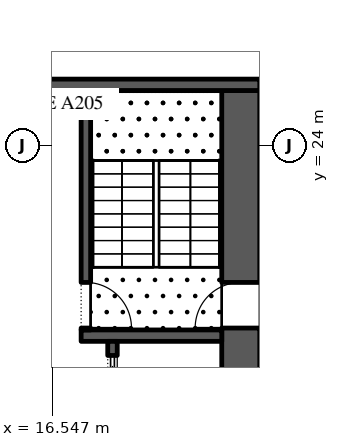
"""IFC4 building model, lengths in metres.
Left out: names, types, materials, properties, quantities, classifications, styles, units other than length and angle.
Written with IfcOpenShell. Run it as: python <this file> out.ifc"""

import sys

from ifc_helpers import new_model, si_unit, direction, frame, frame_2d, origin, place, context, subcontext, project, spatial, rectangle, extrude, element, fill, save


model = new_model("IFC4")
c1 = context("Model", 3, precision=1e-05, world=origin(), true_north=direction((0.0, 1.0)))
c2 = subcontext(c1, "Body", "Model", "MODEL_VIEW")
j1 = project(units=[si_unit("LENGTHUNIT", "METRE"), si_unit("PLANEANGLEUNIT", "RADIAN")], contexts=[c1])
p1 = place(None, origin())
s1 = spatial("IfcSite", under=j1, at=p1, CompositionType="ELEMENT")
p2 = place(p1, origin())
s2 = spatial("IfcBuilding", under=s1, at=p2, CompositionType="ELEMENT")
p3 = place(p2, frame((0.0, 0.0, 14.0)))
s3 = spatial("IfcBuildingStorey", under=s2, at=p3, CompositionType="ELEMENT", Elevation=14.0)
p4 = place(p3, frame((21.5, -2.45, 0.0), z_axis=(0.0, 0.0, 1.0), x_axis=(0.0, 1.0, 0.0)))
e1 = element("IfcWall", 1, at=p4, inside=s3, PredefinedType="SHEAR", context=c2, shape_type="SweptSolid", body=[
    extrude(rectangle(XDim=27.9, YDim=1.0, at=frame_2d((13.95, 0.0))), origin(), (0.0, 0.0, 1.0), 4.9),
])
p5 = place(p4, frame((5.05, 0.0, 0.0)))
e2 = element("IfcOpeningElement", 2, at=p5, cuts=e1, PredefinedType="OPENING", context=c2, shape_type="SweptSolid", body=[
    extrude(rectangle(XDim=1.2, YDim=2.1, at=frame_2d((0.6, 1.05))), frame((0.0, 0.51, 0.0), z_axis=(0.0, -1.0, 0.0), x_axis=(1.0, 0.0, 0.0)), (0.0, 0.0, 1.0), 1.02),
])
p6 = place(p4, frame((21.65, 0.0, 0.0)))
e3 = element("IfcOpeningElement", 3, at=p6, cuts=e1, PredefinedType="OPENING", context=c2, shape_type="SweptSolid", body=[
    extrude(rectangle(XDim=1.2, YDim=2.1, at=frame_2d((0.6, 1.05))), frame((0.0, 0.51, 0.0), z_axis=(0.0, -1.0, 0.0), x_axis=(1.0, 0.0, 0.0)), (0.0, 0.0, 1.0), 1.02),
])
p7 = place(p3, frame((10.0, 25.6, 0.0), z_axis=(0.0, 0.0, 1.0), x_axis=(1.0, 0.0, 0.0)))
e4 = element("IfcWall", 4, at=p7, inside=s3, PredefinedType="SHEAR", context=c2, shape_type="SweptSolid", body=[
    extrude(rectangle(XDim=12.0, YDim=0.3, at=frame_2d((6.0, 0.0))), origin(), (0.0, 0.0, 1.0), 4.9),
])
p8 = place(p3, frame((17.3, 19.0, 0.0), z_axis=(0.0, 0.0, 1.0), x_axis=(1.0, 0.0, 0.0)))
e5 = element("IfcWall", 5, at=p8, inside=s3, PredefinedType="SHEAR", context=c2, shape_type="SweptSolid", body=[
    extrude(rectangle(XDim=3.7, YDim=0.3, at=frame_2d((1.85, 0.0))), origin(), (0.0, 0.0, 1.0), 4.9),
])
p9 = place(p3, frame((17.425, 19.15, 0.0), z_axis=(0.0, 0.0, 1.0), x_axis=(0.0, 1.0, 0.0)))
e6 = element("IfcWall", 6, at=p9, inside=s3, PredefinedType="SHEAR", context=c2, shape_type="SweptSolid", body=[
    extrude(rectangle(XDim=6.3, YDim=0.25, at=frame_2d((3.15, 0.0))), origin(), (0.0, 0.0, 1.0), 4.9),
])
p10 = place(p9, frame((0.05, 0.0, 0.0)))
e7 = element("IfcOpeningElement", 7, at=p10, cuts=e6, PredefinedType="OPENING", context=c2, shape_type="SweptSolid", body=[
    extrude(rectangle(XDim=1.2, YDim=2.1, at=frame_2d((0.6, 1.05))), frame((0.0, 0.135, 0.0), z_axis=(0.0, -1.0, 0.0), x_axis=(1.0, 0.0, 0.0)), (0.0, 0.0, 1.0), 0.27),
])
p11 = place(p3, frame((18.125, 4.15, 0.0), z_axis=(0.0, 0.0, 1.0), x_axis=(0.0, 1.0, 0.0)))
e8 = element("IfcWall", 8, at=p11, inside=s3, PredefinedType="SHEAR", context=c2, shape_type="SweptSolid", body=[
    extrude(rectangle(XDim=14.7, YDim=0.25, at=frame_2d((7.35, 0.0))), origin(), (0.0, 0.0, 1.0), 4.9),
])
p12 = place(p11, frame((0.371, 0.0, 0.0)))
e9 = element("IfcOpeningElement", 9, at=p12, cuts=e8, PredefinedType="OPENING", context=c2, shape_type="SweptSolid", body=[
    extrude(rectangle(XDim=1.1, YDim=2.1, at=frame_2d((0.55, 1.05))), frame((0.0, 0.135, 0.0), z_axis=(0.0, -1.0, 0.0), x_axis=(1.0, 0.0, 0.0)), (0.0, 0.0, 1.0), 0.27),
])
p13 = place(p11, frame((2.514, 0.0, 0.0)))
e10 = element("IfcOpeningElement", 10, at=p13, cuts=e8, PredefinedType="OPENING", context=c2, shape_type="SweptSolid", body=[
    extrude(rectangle(XDim=1.1, YDim=2.1, at=frame_2d((0.55, 1.05))), frame((0.0, 0.135, 0.0), z_axis=(0.0, -1.0, 0.0), x_axis=(1.0, 0.0, 0.0)), (0.0, 0.0, 1.0), 0.27),
])
p14 = place(p11, frame((4.657, 0.0, 0.0)))
e11 = element("IfcOpeningElement", 11, at=p14, cuts=e8, PredefinedType="OPENING", context=c2, shape_type="SweptSolid", body=[
    extrude(rectangle(XDim=1.1, YDim=2.1, at=frame_2d((0.55, 1.05))), frame((0.0, 0.135, 0.0), z_axis=(0.0, -1.0, 0.0), x_axis=(1.0, 0.0, 0.0)), (0.0, 0.0, 1.0), 0.27),
])
p15 = place(p11, frame((6.8, 0.0, 0.0)))
e12 = element("IfcOpeningElement", 12, at=p15, cuts=e8, PredefinedType="OPENING", context=c2, shape_type="SweptSolid", body=[
    extrude(rectangle(XDim=1.1, YDim=2.1, at=frame_2d((0.55, 1.05))), frame((0.0, 0.135, 0.0), z_axis=(0.0, -1.0, 0.0), x_axis=(1.0, 0.0, 0.0)), (0.0, 0.0, 1.0), 0.27),
])
p16 = place(p11, frame((8.943, 0.0, 0.0)))
e13 = element("IfcOpeningElement", 13, at=p16, cuts=e8, PredefinedType="OPENING", context=c2, shape_type="SweptSolid", body=[
    extrude(rectangle(XDim=1.1, YDim=2.1, at=frame_2d((0.55, 1.05))), frame((0.0, 0.135, 0.0), z_axis=(0.0, -1.0, 0.0), x_axis=(1.0, 0.0, 0.0)), (0.0, 0.0, 1.0), 0.27),
])
p17 = place(p11, frame((11.086, 0.0, 0.0)))
e14 = element("IfcOpeningElement", 14, at=p17, cuts=e8, PredefinedType="OPENING", context=c2, shape_type="SweptSolid", body=[
    extrude(rectangle(XDim=1.1, YDim=2.1, at=frame_2d((0.55, 1.05))), frame((0.0, 0.135, 0.0), z_axis=(0.0, -1.0, 0.0), x_axis=(1.0, 0.0, 0.0)), (0.0, 0.0, 1.0), 0.27),
])
p18 = place(p11, frame((13.229, 0.0, 0.0)))
e15 = element("IfcOpeningElement", 15, at=p18, cuts=e8, PredefinedType="OPENING", context=c2, shape_type="SweptSolid", body=[
    extrude(rectangle(XDim=1.1, YDim=2.1, at=frame_2d((0.55, 1.05))), frame((0.0, 0.135, 0.0), z_axis=(0.0, -1.0, 0.0), x_axis=(1.0, 0.0, 0.0)), (0.0, 0.0, 1.0), 0.27),
])
p19 = place(p18, origin())
e16 = element("IfcDoor", 16, at=p19, inside=s3, OperationType="SLIDING_TO_LEFT", PredefinedType="DOOR", context=c2, shape_type="SweptSolid", body=[
    extrude(rectangle(XDim=1.1, YDim=2.1, at=frame_2d((0.55, 1.05))), frame((0.0, 0.025, 0.0), z_axis=(0.0, -1.0, 0.0), x_axis=(1.0, 0.0, 0.0)), (0.0, 0.0, 1.0), 0.05),
])
fill(e15, e16)
p20 = place(p10, frame((1.2, 0.0, 0.0), z_axis=(0.0, 0.0, 1.0), x_axis=(-1.0, 0.0, 0.0)))
e17 = element("IfcDoor", 17, at=p20, inside=s3, OperationType="SINGLE_SWING_LEFT", PredefinedType="DOOR", context=c2, shape_type="SweptSolid", body=[
    extrude(rectangle(XDim=1.2, YDim=2.1, at=frame_2d((0.6, 1.05))), frame((0.0, 0.025, 0.0), z_axis=(0.0, -1.0, 0.0), x_axis=(1.0, 0.0, 0.0)), (0.0, 0.0, 1.0), 0.05),
])
fill(e7, e17)
p21 = place(p6, origin())
e18 = element("IfcDoor", 18, at=p21, inside=s3, OperationType="SINGLE_SWING_RIGHT", PredefinedType="DOOR", context=c2, shape_type="SweptSolid", body=[
    extrude(rectangle(XDim=1.2, YDim=2.1, at=frame_2d((0.6, 1.05))), frame((0.0, 0.025, 0.0), z_axis=(0.0, -1.0, 0.0), x_axis=(1.0, 0.0, 0.0)), (0.0, 0.0, 1.0), 0.05),
])
fill(e3, e18)
save(model, sys.argv[1])
